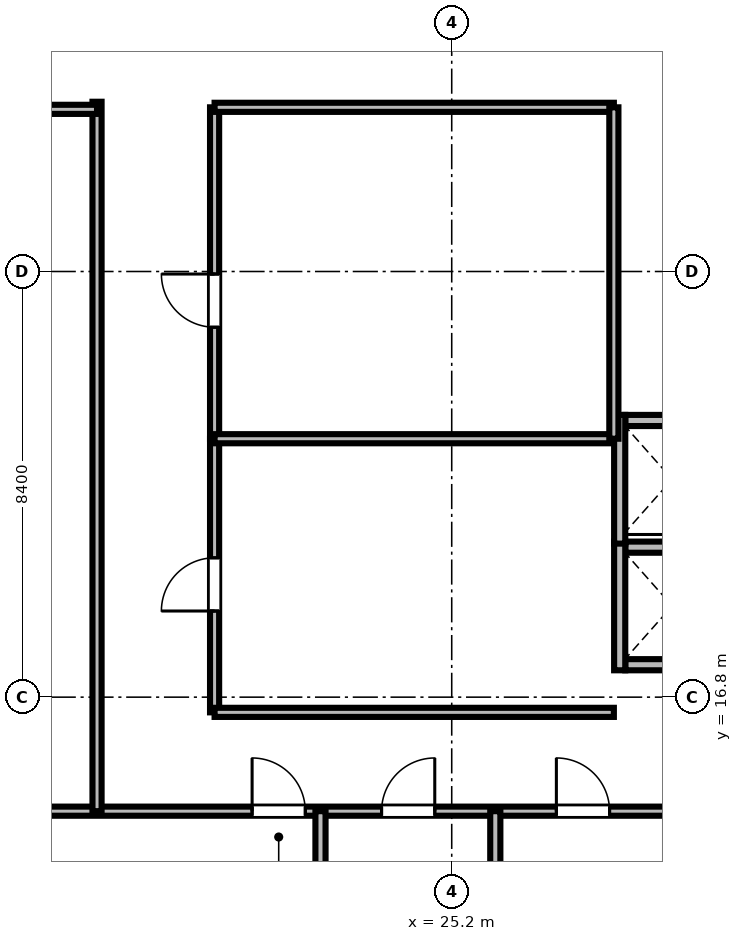
"""IFC4 building model, lengths in metres.
Left out: names, types, materials, properties, quantities, classifications, styles, units other than length and angle.
Written with IfcOpenShell. Run it as: python <this file> out.ifc"""

import sys

from ifc_helpers import new_model, si_unit, direction, frame, frame_2d, origin, place, context, subcontext, project, spatial, rectangle, extrude, source, transform, mapped, element, fill, save


model = new_model("IFC4")
c1 = context("Model", 3, precision=1e-05, world=origin(), true_north=direction((0.0, 1.0)))
c2 = subcontext(c1, "Body", "Model", "MODEL_VIEW")
j1 = project(units=[si_unit("LENGTHUNIT", "METRE"), si_unit("PLANEANGLEUNIT", "RADIAN")], contexts=[c1])
p1 = place(None, origin())
s1 = spatial("IfcSite", under=j1, at=p1, CompositionType="ELEMENT")
p2 = place(p1, origin())
s2 = spatial("IfcBuilding", under=s1, at=p2, CompositionType="ELEMENT")
p3 = place(p2, frame((0.0, 0.0, 111.3)))
s3 = spatial("IfcBuildingStorey", under=s2, at=p3, CompositionType="ELEMENT", Elevation=111.3)
m1 = source(origin(), c2, "Body", "SweptSolid", [
    extrude(rectangle(XDim=1.85, YDim=0.22, at=frame_2d((0.925, 0.0))), origin(), (0.0, 0.0, 1.0), 3.46),
])
for number, where, z_axis, x_axis in (
    (1, (28.625, 17.44, 0.0), (0.0, 0.0, 1.0), (1.0, 0.0, 0.0)),
    (2, (28.625, 19.76, 0.0), (0.0, 0.0, 1.0), (1.0, 0.0, 0.0)),
):
    element("IfcWall", number, at=place(p3, frame(where, z_axis=z_axis, x_axis=x_axis)), inside=s3, PredefinedType="SOLIDWALL", context=c2, shape_type="MappedRepresentation", body=[
        mapped(m1, transform((0.0, 0.0, 0.0), scale=1.0)),
    ])
m2 = source(origin(), c2, "Body", "SweptSolid", [
    extrude(rectangle(XDim=2.54, YDim=0.22, at=frame_2d((1.27, 0.0))), origin(), (0.0, 0.0, 1.0), 3.46),
])
p4 = place(p3, frame((28.515, 17.33, 0.0), z_axis=(0.0, 0.0, 1.0), x_axis=(0.0, 1.0, 0.0)))
e3 = element("IfcWall", 3, at=p4, inside=s3, PredefinedType="SOLIDWALL", context=c2, shape_type="MappedRepresentation", body=[
    mapped(m2, transform((0.0, 0.0, 0.0), scale=1.0)),
])
p5 = place(p3, frame((28.625, 22.26, 0.0), z_axis=(0.0, 0.0, 1.0), x_axis=(1.0, 0.0, 0.0)))
e4 = element("IfcWall", 4, at=p5, inside=s3, PredefinedType="SOLIDWALL", context=c2, shape_type="MappedRepresentation", body=[
    mapped(m1, transform((0.0, 0.0, 0.0), scale=1.0)),
])
p6 = place(p3, frame((28.515, 19.83, 0.0), z_axis=(0.0, 0.0, 1.0), x_axis=(0.0, 1.0, 0.0)))
e5 = element("IfcWall", 5, at=p6, inside=s3, PredefinedType="SOLIDWALL", context=c2, shape_type="MappedRepresentation", body=[
    mapped(m2, transform((0.0, 0.0, 0.0), scale=1.0)),
])
m3 = source(origin(), c2, "Body", "SweptSolid", [
    extrude(rectangle(XDim=46.156, YDim=0.18, at=frame_2d((23.078, 0.0))), origin(), (0.0, 0.0, 1.0), 2.702),
])
p7 = place(p3, frame((6.922, 14.55, 0.0), z_axis=(0.0, 0.0, 1.0), x_axis=(1.0, 0.0, 0.0)))
e6 = element("IfcWall", 6, at=p7, inside=s3, PredefinedType="PARTITIONING", context=c2, shape_type="MappedRepresentation", body=[
    mapped(m3, transform((0.0, 0.0, 0.0), scale=1.0)),
])
m4 = source(origin(), c2, "Body", "SweptSolid", [
    extrude(rectangle(XDim=1.05, YDim=2.2, at=frame_2d((0.525, 1.1))), frame((0.0, 0.1, 0.0), z_axis=(0.0, -1.0, 0.0), x_axis=(1.0, 0.0, 0.0)), (0.0, 0.0, 1.0), 0.2),
])
p8 = place(p7, frame((14.338, 0.0, 0.0)))
e7 = element("IfcOpeningElement", 7, at=p8, cuts=e6, PredefinedType="OPENING", context=c2, shape_type="MappedRepresentation", body=[
    mapped(m4, transform((0.0, 0.0, 0.0), scale=1.0)),
])
p9 = place(p7, frame((16.893, 0.0, 0.0)))
e8 = element("IfcOpeningElement", 8, at=p9, cuts=e6, PredefinedType="OPENING", context=c2, shape_type="MappedRepresentation", body=[
    mapped(m4, transform((0.0, 0.0, 0.0), scale=1.0)),
])
p10 = place(p7, frame((20.344, 0.0, 0.0)))
e9 = element("IfcOpeningElement", 9, at=p10, cuts=e6, PredefinedType="OPENING", context=c2, shape_type="MappedRepresentation", body=[
    mapped(m4, transform((0.0, 0.0, 0.0), scale=1.0)),
])
m5 = source(origin(), c2, "Body", "SweptSolid", [
    extrude(rectangle(XDim=0.95, YDim=2.15, at=frame_2d((0.475, 1.075))), frame((0.0, 0.1, 0.0), z_axis=(0.0, -1.0, 0.0), x_axis=(1.0, 0.0, 0.0)), (0.0, 0.0, 1.0), 0.2),
])
p11 = place(p7, frame((25.842, 0.0, 0.0)))
e10 = element("IfcOpeningElement", 10, at=p11, cuts=e6, PredefinedType="OPENING", context=c2, shape_type="MappedRepresentation", body=[
    mapped(m5, transform((0.0, 0.0, 0.0), scale=1.0)),
])
p12 = place(p7, frame((29.754, 0.0, 0.0)))
e11 = element("IfcOpeningElement", 11, at=p12, cuts=e6, PredefinedType="OPENING", context=c2, shape_type="MappedRepresentation", body=[
    mapped(m4, transform((0.0, 0.0, 0.0), scale=1.0)),
])
p13 = place(p7, frame((35.683, 0.0, 0.0)))
e12 = element("IfcOpeningElement", 12, at=p13, cuts=e6, PredefinedType="OPENING", context=c2, shape_type="MappedRepresentation", body=[
    mapped(m4, transform((0.0, 0.0, 0.0), scale=1.0)),
])
p14 = place(p7, frame((41.828, 0.0, 0.0)))
e13 = element("IfcOpeningElement", 13, at=p14, cuts=e6, PredefinedType="OPENING", context=c2, shape_type="MappedRepresentation", body=[
    mapped(m4, transform((0.0, 0.0, 0.0), scale=1.0)),
])
m6 = source(origin(), c2, "Body", "SweptSolid", [
    extrude(rectangle(XDim=6.54, YDim=0.18, at=frame_2d((3.27, 0.0))), origin(), (0.0, 0.0, 1.0), 2.852),
])
p15 = place(p3, frame((20.52, 21.9, 0.0), z_axis=(0.0, 0.0, 1.0), x_axis=(0.0, 1.0, 0.0)))
e14 = element("IfcWall", 14, at=p15, inside=s3, PredefinedType="PARTITIONING", context=c2, shape_type="MappedRepresentation", body=[
    mapped(m6, transform((0.0, 0.0, 0.0), scale=1.0)),
])
p16 = place(p15, frame((2.2, 0.0, 0.0)))
e15 = element("IfcOpeningElement", 15, at=p16, cuts=e14, PredefinedType="OPENING", context=c2, shape_type="MappedRepresentation", body=[
    mapped(m4, transform((0.0, 0.0, 0.0), scale=1.0)),
])
m7 = source(origin(), c2, "Body", "SweptSolid", [
    extrude(rectangle(XDim=5.4, YDim=0.18, at=frame_2d((2.7, 0.0))), origin(), (0.0, 0.0, 1.0), 2.852),
])
p17 = place(p3, frame((20.52, 16.5, 0.0), z_axis=(0.0, 0.0, 1.0), x_axis=(0.0, 1.0, 0.0)))
e16 = element("IfcWall", 16, at=p17, inside=s3, PredefinedType="PARTITIONING", context=c2, shape_type="MappedRepresentation", body=[
    mapped(m7, transform((0.0, 0.0, 0.0), scale=1.0)),
])
p18 = place(p17, frame((2.0, 0.0, 0.0)))
e17 = element("IfcOpeningElement", 17, at=p18, cuts=e16, PredefinedType="OPENING", context=c2, shape_type="MappedRepresentation", body=[
    mapped(m4, transform((0.0, 0.0, 0.0), scale=1.0)),
])
m8 = source(origin(), c2, "Body", "SweptSolid", [
    extrude(rectangle(XDim=14.0, YDim=0.18, at=frame_2d((7.0, 0.0))), origin(), (0.0, 0.0, 1.0), 2.852),
])
p19 = place(p3, frame((18.2, 14.55, 0.0), z_axis=(0.0, 0.0, 1.0), x_axis=(0.0, 1.0, 0.0)))
e18 = element("IfcWall", 18, at=p19, inside=s3, PredefinedType="PARTITIONING", context=c2, shape_type="MappedRepresentation", body=[
    mapped(m8, transform((0.0, 0.0, 0.0), scale=1.0)),
])
m9 = source(origin(), c2, "Body", "SweptSolid", [
    extrude(rectangle(XDim=12.428, YDim=0.2, at=frame_2d((6.214, 0.0))), origin(), (0.0, 0.0, 1.0), 2.702),
])
for number, where, z_axis, x_axis in (
    (19, (22.61, 2.122, 0.0), (0.0, 0.0, 1.0), (0.0, 1.0, 0.0)),
    (20, (26.06, 2.122, 0.0), (0.0, 0.0, 1.0), (0.0, 1.0, 0.0)),
):
    element("IfcWall", number, at=place(p3, frame(where, z_axis=z_axis, x_axis=x_axis)), inside=s3, PredefinedType="PARTITIONING", context=c2, shape_type="MappedRepresentation", body=[
        mapped(m9, transform((0.0, 0.0, 0.0), scale=1.0)),
    ])
m10 = source(origin(), c2, "Body", "SweptSolid", [
    extrude(rectangle(XDim=11.47, YDim=0.18, at=frame_2d((5.735, 0.0))), origin(), (0.0, 0.0, 1.0), 2.702),
])
p20 = place(p3, frame((6.73, 28.4, 0.0), z_axis=(0.0, 0.0, 1.0), x_axis=(1.0, 0.0, 0.0)))
e21 = element("IfcWall", 21, at=p20, inside=s3, PredefinedType="PARTITIONING", context=c2, shape_type="MappedRepresentation", body=[
    mapped(m10, transform((0.0, 0.0, 0.0), scale=1.0)),
])
m11 = source(origin(), c2, "Body", "SweptSolid", [
    extrude(rectangle(XDim=7.88, YDim=0.18, at=frame_2d((3.94, 0.0))), origin(), (0.0, 0.0, 1.0), 3.46),
])
for number, where, z_axis, x_axis in (
    (22, (20.52, 16.5, 0.0), (0.0, 0.0, 1.0), (1.0, 0.0, 0.0)),
    (23, (20.52, 21.9, 0.0), (0.0, 0.0, 1.0), (1.0, 0.0, 0.0)),
    (24, (20.52, 28.44, 0.0), (0.0, 0.0, 1.0), (1.0, 0.0, 0.0)),
):
    element("IfcWall", number, at=place(p3, frame(where, z_axis=z_axis, x_axis=x_axis)), inside=s3, PredefinedType="PARTITIONING", context=c2, shape_type="MappedRepresentation", body=[
        mapped(m11, transform((0.0, 0.0, 0.0), scale=1.0)),
    ])
p21 = place(p3, frame((28.4, 21.9, 0.0), z_axis=(0.0, 0.0, 1.0), x_axis=(0.0, 1.0, 0.0)))
e25 = element("IfcWall", 25, at=p21, inside=s3, PredefinedType="PARTITIONING", context=c2, shape_type="MappedRepresentation", body=[
    mapped(m6, transform((0.0, 0.0, 0.0), scale=1.0)),
])
m12 = source(origin(), c2, "Body", "SweptSolid", [
    extrude(rectangle(XDim=1.05, YDim=2.2, at=frame_2d((0.525, 1.1))), frame((0.0, 0.025, 0.0), z_axis=(0.0, -1.0, 0.0), x_axis=(1.0, 0.0, 0.0)), (0.0, 0.0, 1.0), 0.05),
])
p22 = place(p8, origin())
e26 = element("IfcDoor", 26, at=p22, inside=s3, OperationType="SINGLE_SWING_LEFT", PredefinedType="DOOR", context=c2, shape_type="MappedRepresentation", body=[
    mapped(m12, transform((0.0, 0.0, 0.0), scale=1.0)),
])
fill(e7, e26)
p23 = place(p9, origin())
e27 = element("IfcDoor", 27, at=p23, inside=s3, OperationType="SINGLE_SWING_RIGHT", PredefinedType="DOOR", context=c2, shape_type="MappedRepresentation", body=[
    mapped(m12, transform((0.0, 0.0, 0.0), scale=1.0)),
])
fill(e8, e27)
p24 = place(p10, origin())
e28 = element("IfcDoor", 28, at=p24, inside=s3, OperationType="SINGLE_SWING_LEFT", PredefinedType="DOOR", context=c2, shape_type="MappedRepresentation", body=[
    mapped(m12, transform((0.0, 0.0, 0.0), scale=1.0)),
])
fill(e9, e28)
p25 = place(p16, origin())
e29 = element("IfcDoor", 29, at=p25, inside=s3, OperationType="SINGLE_SWING_RIGHT", PredefinedType="DOOR", context=c2, shape_type="MappedRepresentation", body=[
    mapped(m12, transform((0.0, 0.0, 0.0), scale=1.0)),
])
fill(e15, e29)
p26 = place(p18, origin())
e30 = element("IfcDoor", 30, at=p26, inside=s3, OperationType="SINGLE_SWING_LEFT", PredefinedType="DOOR", context=c2, shape_type="MappedRepresentation", body=[
    mapped(m12, transform((0.0, 0.0, 0.0), scale=1.0)),
])
fill(e17, e30)
save(model, sys.argv[1])
